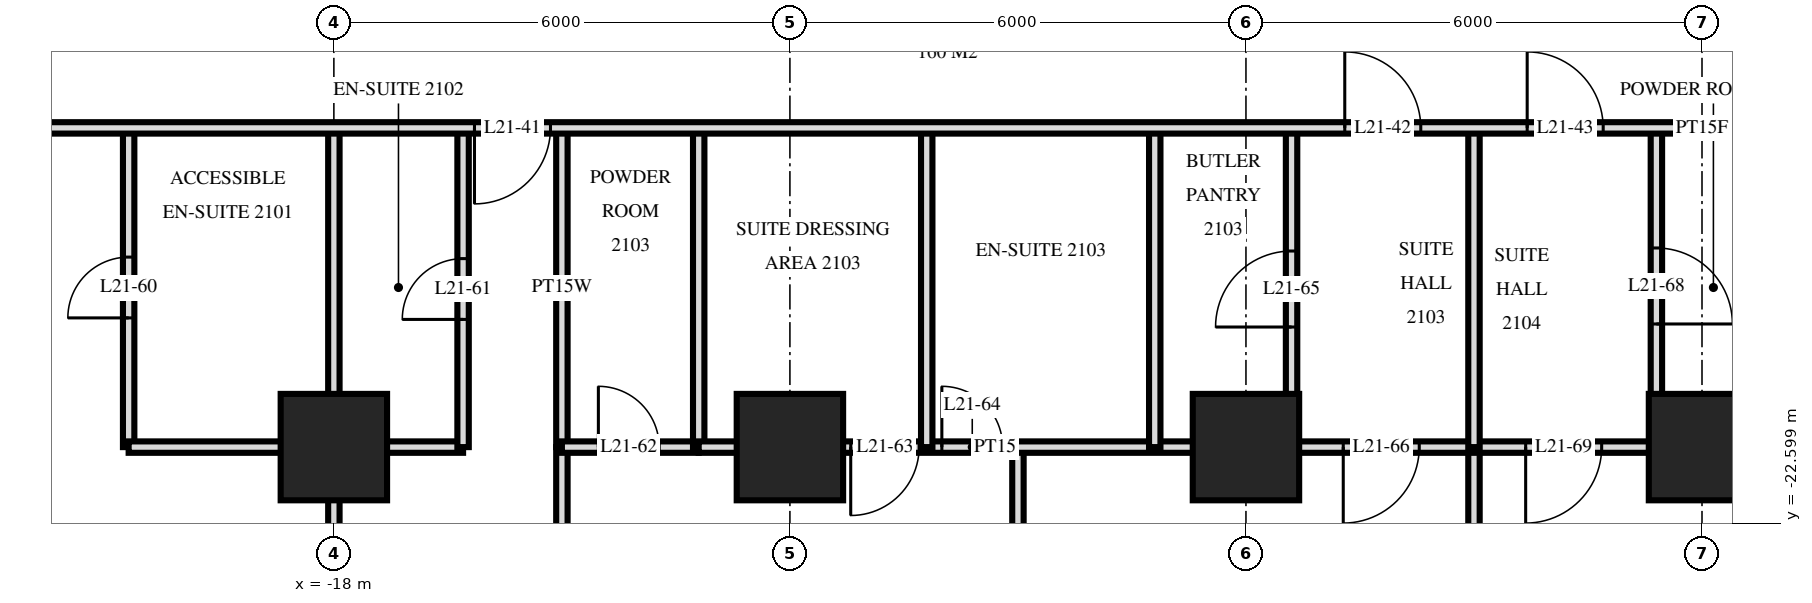
"""IFC4 building model, lengths in metres.
Left out: names, types, materials, properties, quantities, classifications, styles, units other than length and angle.
Written with IfcOpenShell. Run it as: python <this file> out.ifc"""

import sys

from ifc_helpers import new_model, si_unit, direction, frame, frame_2d, origin, origin_2d, place, context, subcontext, project, spatial, rectangle, extrude, element, fill, save


model = new_model("IFC4")
c1 = context("Model", 3, precision=1e-05, world=origin(), true_north=direction((0.0, 1.0)))
c2 = subcontext(c1, "Body", "Model", "MODEL_VIEW")
j1 = project(units=[si_unit("LENGTHUNIT", "METRE"), si_unit("PLANEANGLEUNIT", "RADIAN")], contexts=[c1])
p1 = place(None, origin())
s1 = spatial("IfcSite", under=j1, at=p1, CompositionType="ELEMENT")
p2 = place(p1, origin())
s2 = spatial("IfcBuilding", under=s1, at=p2, CompositionType="ELEMENT")
p3 = place(p2, frame((0.0, 0.0, 85.2)))
s3 = spatial("IfcBuildingStorey", under=s2, at=p3, CompositionType="ELEMENT", Elevation=85.2)
for number, where, z_axis, x_axis in (
    (1, (-18.0, -21.6, 0.0), (0.0, 0.0, 1.0), (1.0, 0.0, 0.0)),
    (2, (-12.0, -21.6, 0.0), (0.0, 0.0, 1.0), (1.0, 0.0, 0.0)),
    (3, (-6.0, -21.6, 0.0), (0.0, 0.0, 1.0), (1.0, 0.0, 0.0)),
    (4, (0.0, -21.6, 0.0), (0.0, 0.0, 1.0), (1.0, 0.0, 0.0)),
):
    element("IfcColumn", number, at=place(p3, frame(where, z_axis=z_axis, x_axis=x_axis)), inside=s3, PredefinedType="COLUMN", context=c2, shape_type="SweptSolid", body=[
        extrude(rectangle(XDim=1.4, YDim=1.4, at=origin_2d()), origin(), (0.0, 0.0, 1.0), 3.6),
    ])
p4 = place(p3, frame((-0.6, -21.6, 0.0), z_axis=(0.0, 0.0, 1.0), x_axis=(0.0, 1.0, 0.0)))
e5 = element("IfcWall", 5, at=p4, inside=s3, PredefinedType="PARTITIONING", context=c2, shape_type="SweptSolid", body=[
    extrude(rectangle(XDim=4.2, YDim=0.15, at=frame_2d((2.1, 0.0))), origin(), (0.0, 0.0, 1.0), 3.32),
])
p5 = place(p4, frame((1.62, 0.0, 0.0)))
e6 = element("IfcOpeningElement", 6, at=p5, cuts=e5, PredefinedType="OPENING", context=c2, shape_type="SweptSolid", body=[
    extrude(rectangle(XDim=1.0, YDim=2.1, at=frame_2d((0.5, 1.05))), frame((0.0, 0.085, 0.0), z_axis=(0.0, -1.0, 0.0), x_axis=(1.0, 0.0, 0.0)), (0.0, 0.0, 1.0), 0.17),
])
p6 = place(p3, frame((-3.0, -21.6, 0.0), z_axis=(0.0, 0.0, 1.0), x_axis=(0.0, 1.0, 0.0)))
e7 = element("IfcWall", 7, at=p6, inside=s3, PredefinedType="PARTITIONING", context=c2, shape_type="SweptSolid", body=[
    extrude(rectangle(XDim=4.2, YDim=0.15, at=frame_2d((2.1, 0.0))), origin(), (0.0, 0.0, 1.0), 3.32),
])
p7 = place(p3, frame((-3.0, -29.22, 0.0), z_axis=(0.0, 0.0, 1.0), x_axis=(0.0, 1.0, 0.0)))
e8 = element("IfcWall", 8, at=p7, inside=s3, PredefinedType="PARTITIONING", context=c2, shape_type="SweptSolid", body=[
    extrude(rectangle(XDim=7.62, YDim=0.15, at=frame_2d((3.81, 0.0))), origin(), (0.0, 0.0, 1.0), 3.32),
])
p8 = place(p3, frame((-5.4, -21.6, 0.0), z_axis=(0.0, 0.0, 1.0), x_axis=(0.0, 1.0, 0.0)))
e9 = element("IfcWall", 9, at=p8, inside=s3, PredefinedType="PARTITIONING", context=c2, shape_type="SweptSolid", body=[
    extrude(rectangle(XDim=4.2, YDim=0.15, at=frame_2d((2.1, 0.0))), origin(), (0.0, 0.0, 1.0), 3.32),
])
p9 = place(p8, frame((1.58, 0.0, 0.0)))
e10 = element("IfcOpeningElement", 10, at=p9, cuts=e9, PredefinedType="OPENING", context=c2, shape_type="SweptSolid", body=[
    extrude(rectangle(XDim=1.0, YDim=2.1, at=frame_2d((0.5, 1.05))), frame((0.0, 0.085, 0.0), z_axis=(0.0, -1.0, 0.0), x_axis=(1.0, 0.0, 0.0)), (0.0, 0.0, 1.0), 0.17),
])
p10 = place(p3, frame((-7.2, -21.6, 0.0), z_axis=(0.0, 0.0, 1.0), x_axis=(0.0, 1.0, 0.0)))
e11 = element("IfcWall", 11, at=p10, inside=s3, PredefinedType="PARTITIONING", context=c2, shape_type="SweptSolid", body=[
    extrude(rectangle(XDim=4.2, YDim=0.15, at=frame_2d((2.1, 0.0))), origin(), (0.0, 0.0, 1.0), 3.32),
])
p11 = place(p3, frame((-9.0, -29.22, 0.0), z_axis=(0.0, 0.0, 1.0), x_axis=(0.0, 1.0, 0.0)))
e12 = element("IfcWall", 12, at=p11, inside=s3, PredefinedType="PARTITIONING", context=c2, shape_type="SweptSolid", body=[
    extrude(rectangle(XDim=7.62, YDim=0.15, at=frame_2d((3.81, 0.0))), origin(), (0.0, 0.0, 1.0), 3.32),
])
p12 = place(p11, frame((3.27, 0.0, 0.0)))
e13 = element("IfcOpeningElement", 13, at=p12, cuts=e12, PredefinedType="OPENING", context=c2, shape_type="SweptSolid", body=[
    extrude(rectangle(XDim=0.9, YDim=2.1, at=frame_2d((0.45, 1.05))), frame((0.0, 0.085, 0.0), z_axis=(0.0, -1.0, 0.0), x_axis=(1.0, 0.0, 0.0)), (0.0, 0.0, 1.0), 0.17),
])
p13 = place(p3, frame((-10.2, -21.6, 0.0), z_axis=(0.0, 0.0, 1.0), x_axis=(0.0, 1.0, 0.0)))
e14 = element("IfcWall", 14, at=p13, inside=s3, PredefinedType="PARTITIONING", context=c2, shape_type="SweptSolid", body=[
    extrude(rectangle(XDim=4.2, YDim=0.15, at=frame_2d((2.1, 0.0))), origin(), (0.0, 0.0, 1.0), 3.32),
])
p14 = place(p3, frame((-13.2, -21.6, 0.0), z_axis=(0.0, 0.0, 1.0), x_axis=(0.0, 1.0, 0.0)))
e15 = element("IfcWall", 15, at=p14, inside=s3, PredefinedType="PLUMBINGWALL", context=c2, shape_type="SweptSolid", body=[
    extrude(rectangle(XDim=4.2, YDim=0.15, at=frame_2d((2.1, 0.0))), origin(), (0.0, 0.0, 1.0), 3.32),
])
p15 = place(p3, frame((-15.0, -29.22, 0.0), z_axis=(0.0, 0.0, 1.0), x_axis=(0.0, 1.0, 0.0)))
e16 = element("IfcWall", 16, at=p15, inside=s3, PredefinedType="PARTITIONING", context=c2, shape_type="SweptSolid", body=[
    extrude(rectangle(XDim=7.62, YDim=0.15, at=frame_2d((3.81, 0.0))), origin(), (0.0, 0.0, 1.0), 3.32),
])
p16 = place(p3, frame((-15.0, -21.6, 0.0), z_axis=(0.0, 0.0, 1.0), x_axis=(0.0, 1.0, 0.0)))
e17 = element("IfcWall", 17, at=p16, inside=s3, PredefinedType="PLUMBINGWALL", context=c2, shape_type="SweptSolid", body=[
    extrude(rectangle(XDim=4.2, YDim=0.15, at=frame_2d((2.1, 0.0))), origin(), (0.0, 0.0, 1.0), 3.32),
])
p17 = place(p3, frame((-16.3, -21.6, 0.0), z_axis=(0.0, 0.0, 1.0), x_axis=(0.0, 1.0, 0.0)))
e18 = element("IfcWall", 18, at=p17, inside=s3, PredefinedType="PARTITIONING", context=c2, shape_type="SweptSolid", body=[
    extrude(rectangle(XDim=4.2, YDim=0.15, at=frame_2d((2.1, 0.0))), origin(), (0.0, 0.0, 1.0), 3.32),
])
p18 = place(p17, frame((1.68, 0.0, 0.0)))
e19 = element("IfcOpeningElement", 19, at=p18, cuts=e18, PredefinedType="OPENING", context=c2, shape_type="SweptSolid", body=[
    extrude(rectangle(XDim=0.8, YDim=2.1, at=frame_2d((0.4, 1.05))), frame((0.0, 0.085, 0.0), z_axis=(0.0, -1.0, 0.0), x_axis=(1.0, 0.0, 0.0)), (0.0, 0.0, 1.0), 0.17),
])
p19 = place(p3, frame((-18.0, -29.22, 0.0), z_axis=(0.0, 0.0, 1.0), x_axis=(0.0, 1.0, 0.0)))
e20 = element("IfcWall", 20, at=p19, inside=s3, PredefinedType="PARTITIONING", context=c2, shape_type="SweptSolid", body=[
    extrude(rectangle(XDim=11.82, YDim=0.15, at=frame_2d((5.91, 0.0))), origin(), (0.0, 0.0, 1.0), 3.32),
])
p20 = place(p3, frame((-20.7, -21.6, 0.0), z_axis=(0.0, 0.0, 1.0), x_axis=(0.0, 1.0, 0.0)))
e21 = element("IfcWall", 21, at=p20, inside=s3, PredefinedType="PARTITIONING", context=c2, shape_type="SweptSolid", body=[
    extrude(rectangle(XDim=4.2, YDim=0.15, at=frame_2d((2.1, 0.0))), origin(), (0.0, 0.0, 1.0), 3.32),
])
p21 = place(p20, frame((1.7, 0.0, 0.0)))
e22 = element("IfcOpeningElement", 22, at=p21, cuts=e21, PredefinedType="OPENING", context=c2, shape_type="SweptSolid", body=[
    extrude(rectangle(XDim=0.8, YDim=2.1, at=frame_2d((0.4, 1.05))), frame((0.0, 0.085, 0.0), z_axis=(0.0, -1.0, 0.0), x_axis=(1.0, 0.0, 0.0)), (0.0, 0.0, 1.0), 0.17),
])
p22 = place(p3, frame((-5.4, -21.6, 0.0), z_axis=(0.0, 0.0, 1.0), x_axis=(1.0, 0.0, 0.0)))
e23 = element("IfcWall", 23, at=p22, inside=s3, PredefinedType="PARTITIONING", context=c2, shape_type="SweptSolid", body=[
    extrude(rectangle(XDim=4.8, YDim=0.15, at=frame_2d((2.4, 0.0))), origin(), (0.0, 0.0, 1.0), 3.32),
])
p23 = place(p22, frame((0.68, 0.0, 0.0)))
e24 = element("IfcOpeningElement", 24, at=p23, cuts=e23, PredefinedType="OPENING", context=c2, shape_type="SweptSolid", body=[
    extrude(rectangle(XDim=1.0, YDim=2.1, at=frame_2d((0.5, 1.05))), frame((0.0, 0.085, 0.0), z_axis=(0.0, -1.0, 0.0), x_axis=(1.0, 0.0, 0.0)), (0.0, 0.0, 1.0), 0.17),
])
p24 = place(p22, frame((3.08, 0.0, 0.0)))
e25 = element("IfcOpeningElement", 25, at=p24, cuts=e23, PredefinedType="OPENING", context=c2, shape_type="SweptSolid", body=[
    extrude(rectangle(XDim=1.0, YDim=2.1, at=frame_2d((0.5, 1.05))), frame((0.0, 0.085, 0.0), z_axis=(0.0, -1.0, 0.0), x_axis=(1.0, 0.0, 0.0)), (0.0, 0.0, 1.0), 0.17),
])
p25 = place(p3, frame((-20.7, -21.6, 0.0), z_axis=(0.0, 0.0, 1.0), x_axis=(1.0, 0.0, 0.0)))
e26 = element("IfcWall", 26, at=p25, inside=s3, PredefinedType="PARTITIONING", context=c2, shape_type="SweptSolid", body=[
    extrude(rectangle(XDim=4.4, YDim=0.15, at=frame_2d((2.2, 0.0))), origin(), (0.0, 0.0, 1.0), 3.32),
])
p26 = place(p3, frame((-13.2, -21.6, 0.0), z_axis=(0.0, 0.0, 1.0), x_axis=(1.0, 0.0, 0.0)))
e27 = element("IfcWall", 27, at=p26, inside=s3, PredefinedType="PARTITIONING", context=c2, shape_type="SweptSolid", body=[
    extrude(rectangle(XDim=7.8, YDim=0.15, at=frame_2d((3.9, 0.0))), origin(), (0.0, 0.0, 1.0), 3.32),
])
p27 = place(p26, frame((2.0, 0.0, 0.0)))
e28 = element("IfcOpeningElement", 28, at=p27, cuts=e27, PredefinedType="OPENING", context=c2, shape_type="SweptSolid", body=[
    extrude(rectangle(XDim=0.9, YDim=2.1, at=frame_2d((0.45, 1.05))), frame((0.0, 0.085, 0.0), z_axis=(0.0, -1.0, 0.0), x_axis=(1.0, 0.0, 0.0)), (0.0, 0.0, 1.0), 0.17),
])
p28 = place(p26, frame((3.199, 0.0, 0.0)))
e29 = element("IfcOpeningElement", 29, at=p28, cuts=e27, PredefinedType="OPENING", context=c2, shape_type="SweptSolid", body=[
    extrude(rectangle(XDim=0.8, YDim=2.1, at=frame_2d((0.4, 1.05))), frame((0.0, 0.085, 0.0), z_axis=(0.0, -1.0, 0.0), x_axis=(1.0, 0.0, 0.0)), (0.0, 0.0, 1.0), 0.17),
])
p29 = place(p3, frame((-15.0, -21.6, 0.0), z_axis=(0.0, 0.0, 1.0), x_axis=(1.0, 0.0, 0.0)))
e30 = element("IfcWall", 30, at=p29, inside=s3, PredefinedType="PLUMBINGWALL", context=c2, shape_type="SweptSolid", body=[
    extrude(rectangle(XDim=1.8, YDim=0.15, at=frame_2d((0.9, 0.0))), origin(), (0.0, 0.0, 1.0), 3.32),
])
p30 = place(p29, frame((0.48, 0.0, 0.0)))
e31 = element("IfcOpeningElement", 31, at=p30, cuts=e30, PredefinedType="OPENING", context=c2, shape_type="SweptSolid", body=[
    extrude(rectangle(XDim=0.8, YDim=2.1, at=frame_2d((0.4, 1.05))), frame((0.0, 0.085, 0.0), z_axis=(0.0, -1.0, 0.0), x_axis=(1.0, 0.0, 0.0)), (0.0, 0.0, 1.0), 0.17),
])
p31 = place(p3, frame((-0.6, -21.6, 0.0), z_axis=(0.0, 0.0, 1.0), x_axis=(1.0, 0.0, 0.0)))
e32 = element("IfcWall", 32, at=p31, inside=s3, PredefinedType="PLUMBINGWALL", context=c2, shape_type="SweptSolid", body=[
    extrude(rectangle(XDim=1.5, YDim=0.15, at=frame_2d((0.75, 0.0))), origin(), (0.0, 0.0, 1.0), 3.32),
])
p32 = place(p3, frame((-33.12, -17.4, 0.0), z_axis=(0.0, 0.0, 1.0), x_axis=(1.0, 0.0, 0.0)))
e33 = element("IfcWall", 33, at=p32, inside=s3, PredefinedType="PARTITIONING", context=c2, shape_type="SweptSolid", body=[
    extrude(rectangle(XDim=66.24, YDim=0.15, at=frame_2d((33.12, 0.0))), origin(), (0.0, 0.0, 1.0), 3.32),
])
p33 = place(p32, frame((10.27, 0.0, 0.0)))
e34 = element("IfcOpeningElement", 34, at=p33, cuts=e33, PredefinedType="OPENING", context=c2, shape_type="SweptSolid", body=[
    extrude(rectangle(XDim=1.0, YDim=2.1, at=frame_2d((0.5, 1.05))), frame((0.0, 0.085, 0.0), z_axis=(0.0, -1.0, 0.0), x_axis=(1.0, 0.0, 0.0)), (0.0, 0.0, 1.0), 0.17),
])
p34 = place(p32, frame((16.97, 0.0, 0.0)))
e35 = element("IfcOpeningElement", 35, at=p34, cuts=e33, PredefinedType="OPENING", context=c2, shape_type="SweptSolid", body=[
    extrude(rectangle(XDim=1.0, YDim=2.1, at=frame_2d((0.5, 1.05))), frame((0.0, 0.085, 0.0), z_axis=(0.0, -1.0, 0.0), x_axis=(1.0, 0.0, 0.0)), (0.0, 0.0, 1.0), 0.17),
])
p35 = place(p32, frame((28.42, 0.0, 0.0)))
e36 = element("IfcOpeningElement", 36, at=p35, cuts=e33, PredefinedType="OPENING", context=c2, shape_type="SweptSolid", body=[
    extrude(rectangle(XDim=1.0, YDim=2.1, at=frame_2d((0.5, 1.05))), frame((0.0, 0.085, 0.0), z_axis=(0.0, -1.0, 0.0), x_axis=(1.0, 0.0, 0.0)), (0.0, 0.0, 1.0), 0.17),
])
p36 = place(p32, frame((30.82, 0.0, 0.0)))
e37 = element("IfcOpeningElement", 37, at=p36, cuts=e33, PredefinedType="OPENING", context=c2, shape_type="SweptSolid", body=[
    extrude(rectangle(XDim=1.0, YDim=2.1, at=frame_2d((0.5, 1.05))), frame((0.0, 0.085, 0.0), z_axis=(0.0, -1.0, 0.0), x_axis=(1.0, 0.0, 0.0)), (0.0, 0.0, 1.0), 0.17),
])
p37 = place(p32, frame((39.27, 0.0, 0.0)))
e38 = element("IfcOpeningElement", 38, at=p37, cuts=e33, PredefinedType="OPENING", context=c2, shape_type="SweptSolid", body=[
    extrude(rectangle(XDim=1.0, YDim=2.1, at=frame_2d((0.5, 1.05))), frame((0.0, 0.085, 0.0), z_axis=(0.0, -1.0, 0.0), x_axis=(1.0, 0.0, 0.0)), (0.0, 0.0, 1.0), 0.17),
])
p38 = place(p32, frame((45.22, 0.0, 0.0)))
e39 = element("IfcOpeningElement", 39, at=p38, cuts=e33, PredefinedType="OPENING", context=c2, shape_type="SweptSolid", body=[
    extrude(rectangle(XDim=1.0, YDim=2.1, at=frame_2d((0.5, 1.05))), frame((0.0, 0.085, 0.0), z_axis=(0.0, -1.0, 0.0), x_axis=(1.0, 0.0, 0.0)), (0.0, 0.0, 1.0), 0.17),
])
p39 = place(p32, frame((48.27, 0.0, 0.0)))
e40 = element("IfcOpeningElement", 40, at=p39, cuts=e33, PredefinedType="OPENING", context=c2, shape_type="SweptSolid", body=[
    extrude(rectangle(XDim=1.0, YDim=2.1, at=frame_2d((0.5, 1.05))), frame((0.0, 0.085, 0.0), z_axis=(0.0, -1.0, 0.0), x_axis=(1.0, 0.0, 0.0)), (0.0, 0.0, 1.0), 0.17),
])
p40 = place(p32, frame((1.87, 0.0, 0.0)))
e41 = element("IfcOpeningElement", 41, at=p40, cuts=e33, PredefinedType="OPENING", context=c2, shape_type="SweptSolid", body=[
    extrude(rectangle(XDim=1.0, YDim=2.1, at=frame_2d((0.5, 1.05))), frame((0.0, 0.085, 0.0), z_axis=(0.0, -1.0, 0.0), x_axis=(1.0, 0.0, 0.0)), (0.0, 0.0, 1.0), 0.17),
])
p41 = place(p32, frame((60.37, 0.0, 0.0)))
e42 = element("IfcOpeningElement", 42, at=p41, cuts=e33, PredefinedType="OPENING", context=c2, shape_type="SweptSolid", body=[
    extrude(rectangle(XDim=1.0, YDim=2.1, at=frame_2d((0.5, 1.05))), frame((0.0, 0.085, 0.0), z_axis=(0.0, -1.0, 0.0), x_axis=(1.0, 0.0, 0.0)), (0.0, 0.0, 1.0), 0.17),
])
p42 = place(p34, frame((0.5, 0.0, 0.0), z_axis=(0.0, 0.0, 1.0), x_axis=(-1.0, 0.0, 0.0)))
e43 = element("IfcDoor", 43, at=p42, inside=s3, OperationType="SINGLE_SWING_LEFT", PredefinedType="DOOR", context=c2, shape_type="SweptSolid", body=[
    extrude(rectangle(XDim=1.0, YDim=2.1, at=frame_2d((0.0, 1.05))), frame((0.0, -0.025, 0.0), z_axis=(0.0, 1.0, 0.0), x_axis=(-1.0, 0.0, 0.0)), (0.0, 0.0, 1.0), 0.05),
])
fill(e35, e43)
p43 = place(p35, origin())
e44 = element("IfcDoor", 44, at=p43, inside=s3, OperationType="SINGLE_SWING_RIGHT", PredefinedType="DOOR", context=c2, shape_type="SweptSolid", body=[
    extrude(rectangle(XDim=1.0, YDim=2.1, at=frame_2d((0.5, 1.05))), frame((0.0, 0.025, 0.0), z_axis=(0.0, -1.0, 0.0), x_axis=(1.0, 0.0, 0.0)), (0.0, 0.0, 1.0), 0.05),
])
fill(e36, e44)
p44 = place(p36, origin())
e45 = element("IfcDoor", 45, at=p44, inside=s3, OperationType="SINGLE_SWING_RIGHT", PredefinedType="DOOR", context=c2, shape_type="SweptSolid", body=[
    extrude(rectangle(XDim=1.0, YDim=2.1, at=frame_2d((0.5, 1.05))), frame((0.0, 0.025, 0.0), z_axis=(0.0, -1.0, 0.0), x_axis=(1.0, 0.0, 0.0)), (0.0, 0.0, 1.0), 0.05),
])
fill(e37, e45)
p45 = place(p21, origin())
e46 = element("IfcDoor", 46, at=p45, inside=s3, OperationType="SINGLE_SWING_RIGHT", PredefinedType="DOOR", context=c2, shape_type="SweptSolid", body=[
    extrude(rectangle(XDim=0.8, YDim=2.1, at=frame_2d((0.4, 1.05))), frame((0.0, 0.025, 0.0), z_axis=(0.0, -1.0, 0.0), x_axis=(1.0, 0.0, 0.0)), (0.0, 0.0, 1.0), 0.05),
])
fill(e22, e46)
p46 = place(p18, origin())
e47 = element("IfcDoor", 47, at=p46, inside=s3, OperationType="SINGLE_SWING_RIGHT", PredefinedType="DOOR", context=c2, shape_type="SweptSolid", body=[
    extrude(rectangle(XDim=0.8, YDim=2.1, at=frame_2d((0.4, 1.05))), frame((0.0, 0.025, 0.0), z_axis=(0.0, -1.0, 0.0), x_axis=(1.0, 0.0, 0.0)), (0.0, 0.0, 1.0), 0.05),
])
fill(e19, e47)
p47 = place(p30, origin())
e48 = element("IfcDoor", 48, at=p47, inside=s3, OperationType="SINGLE_SWING_RIGHT", PredefinedType="DOOR", context=c2, shape_type="SweptSolid", body=[
    extrude(rectangle(XDim=0.8, YDim=2.1, at=frame_2d((0.4, 1.05))), frame((0.0, 0.025, 0.0), z_axis=(0.0, -1.0, 0.0), x_axis=(1.0, 0.0, 0.0)), (0.0, 0.0, 1.0), 0.05),
])
fill(e31, e48)
p48 = place(p27, frame((0.45, 0.0, 0.0), z_axis=(0.0, 0.0, 1.0), x_axis=(-1.0, 0.0, 0.0)))
e49 = element("IfcDoor", 49, at=p48, inside=s3, OperationType="SINGLE_SWING_LEFT", PredefinedType="DOOR", context=c2, shape_type="SweptSolid", body=[
    extrude(rectangle(XDim=0.9, YDim=2.1, at=frame_2d((0.0, 1.05))), frame((0.0, -0.025, 0.0), z_axis=(0.0, 1.0, 0.0), x_axis=(-1.0, 0.0, 0.0)), (0.0, 0.0, 1.0), 0.05),
])
fill(e28, e49)
p49 = place(p28, origin())
e50 = element("IfcDoor", 50, at=p49, inside=s3, OperationType="SINGLE_SWING_RIGHT", PredefinedType="DOOR", context=c2, shape_type="SweptSolid", body=[
    extrude(rectangle(XDim=0.8, YDim=2.1, at=frame_2d((0.4, 1.05))), frame((0.0, 0.025, 0.0), z_axis=(0.0, -1.0, 0.0), x_axis=(1.0, 0.0, 0.0)), (0.0, 0.0, 1.0), 0.05),
])
fill(e29, e50)
p50 = place(p9, origin())
e51 = element("IfcDoor", 51, at=p50, inside=s3, OperationType="SINGLE_SWING_RIGHT", PredefinedType="DOOR", context=c2, shape_type="SweptSolid", body=[
    extrude(rectangle(XDim=1.0, YDim=2.1, at=frame_2d((0.5, 1.05))), frame((0.0, 0.025, 0.0), z_axis=(0.0, -1.0, 0.0), x_axis=(1.0, 0.0, 0.0)), (0.0, 0.0, 1.0), 0.05),
])
fill(e10, e51)
p51 = place(p23, frame((0.5, 0.0, 0.0), z_axis=(0.0, 0.0, 1.0), x_axis=(-1.0, 0.0, 0.0)))
e52 = element("IfcDoor", 52, at=p51, inside=s3, OperationType="SINGLE_SWING_LEFT", PredefinedType="DOOR", context=c2, shape_type="SweptSolid", body=[
    extrude(rectangle(XDim=1.0, YDim=2.1, at=frame_2d((0.0, 1.05))), frame((0.0, -0.025, 0.0), z_axis=(0.0, 1.0, 0.0), x_axis=(-1.0, 0.0, 0.0)), (0.0, 0.0, 1.0), 0.05),
])
fill(e24, e52)
p52 = place(p5, frame((0.5, 0.0, 0.0), z_axis=(0.0, 0.0, 1.0), x_axis=(-1.0, 0.0, 0.0)))
e53 = element("IfcDoor", 53, at=p52, inside=s3, OperationType="SINGLE_SWING_LEFT", PredefinedType="DOOR", context=c2, shape_type="SweptSolid", body=[
    extrude(rectangle(XDim=1.0, YDim=2.1, at=frame_2d((0.0, 1.05))), frame((0.0, -0.025, 0.0), z_axis=(0.0, 1.0, 0.0), x_axis=(-1.0, 0.0, 0.0)), (0.0, 0.0, 1.0), 0.05),
])
fill(e6, e53)
p53 = place(p24, frame((0.5, 0.0, 0.0), z_axis=(0.0, 0.0, 1.0), x_axis=(-1.0, 0.0, 0.0)))
e54 = element("IfcDoor", 54, at=p53, inside=s3, OperationType="SINGLE_SWING_LEFT", PredefinedType="DOOR", context=c2, shape_type="SweptSolid", body=[
    extrude(rectangle(XDim=1.0, YDim=2.1, at=frame_2d((0.0, 1.05))), frame((0.0, -0.025, 0.0), z_axis=(0.0, 1.0, 0.0), x_axis=(-1.0, 0.0, 0.0)), (0.0, 0.0, 1.0), 0.05),
])
fill(e25, e54)
save(model, sys.argv[1])
